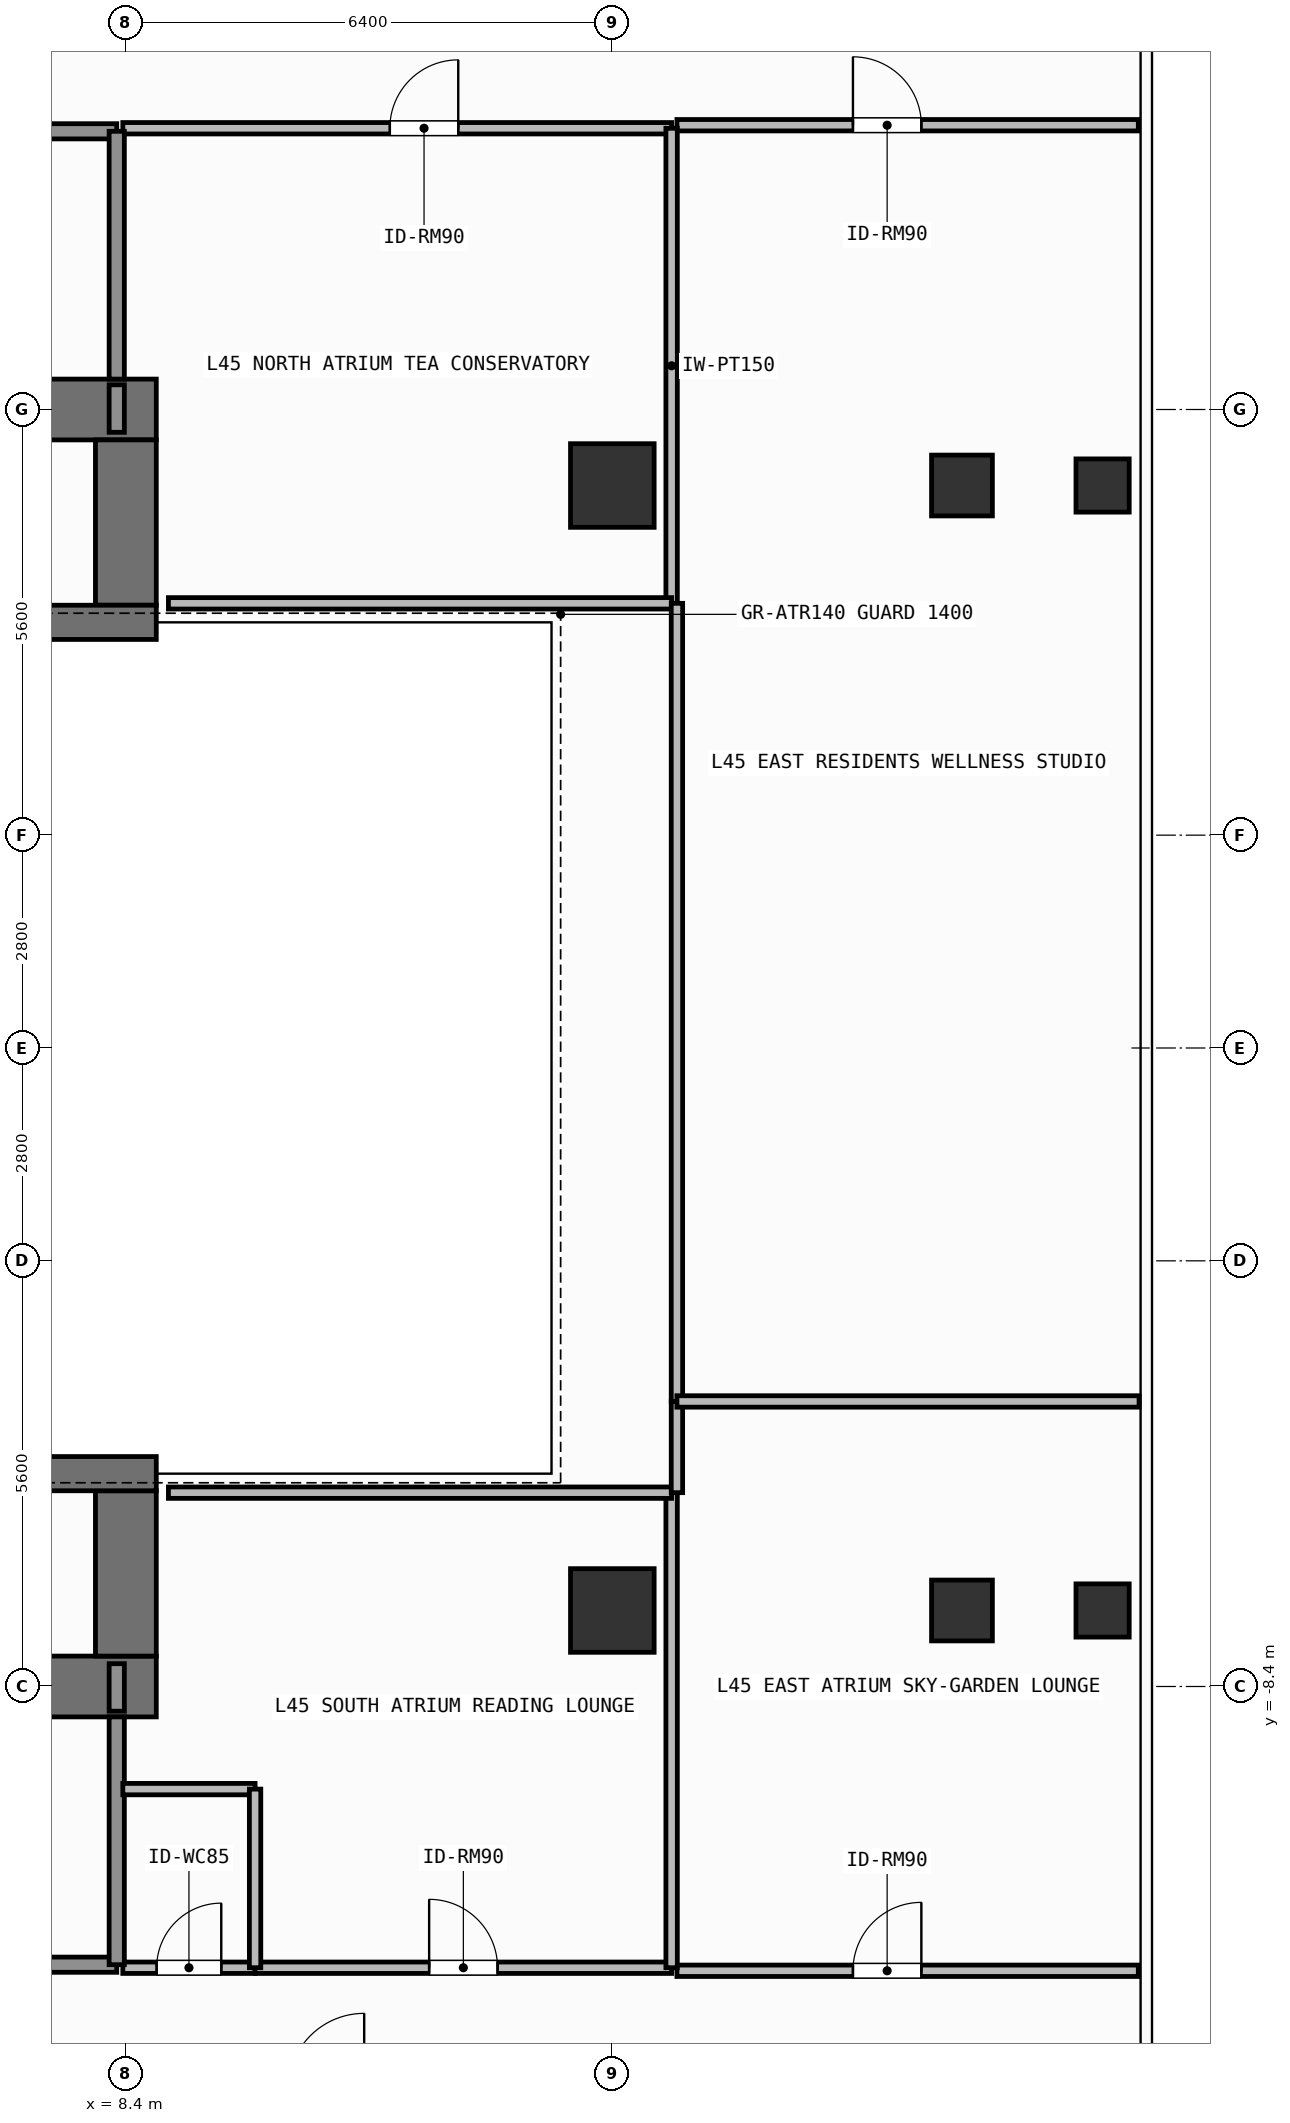
"""IFC4 building model, lengths in metres.
Left out: names, types, materials, properties, quantities, classifications, styles, units other than length and angle.
Written with IfcOpenShell. Run it as: python <this file> out.ifc"""

import sys

from ifc_helpers import new_model, si_unit, direction, frame, frame_2d, origin, origin_2d, place, context, subcontext, project, spatial, rectangle, hollow_rectangle, extrude, element, fill, save


model = new_model("IFC4")
c1 = context("Model", 3, precision=1e-05, world=origin(), true_north=direction((0.0, 1.0)))
c2 = subcontext(c1, "Body", "Model", "MODEL_VIEW")
j1 = project(units=[si_unit("LENGTHUNIT", "METRE"), si_unit("PLANEANGLEUNIT", "RADIAN")], contexts=[c1])
p1 = place(None, origin())
s1 = spatial("IfcSite", under=j1, at=p1, CompositionType="ELEMENT")
p2 = place(p1, origin())
s2 = spatial("IfcBuilding", under=s1, at=p2, CompositionType="ELEMENT")
p3 = place(p2, frame((0.0, 0.0, 183.6)))
s3 = spatial("IfcBuildingStorey", under=s2, at=p3, CompositionType="ELEMENT", Elevation=183.6)
p4 = place(p3, frame((6.12, -8.4, 0.0), z_axis=(0.0, 0.0, 1.0), x_axis=(1.0, 0.0, 0.0)))
e1 = element("IfcWall", 1, at=p4, inside=s3, PredefinedType="SHEAR", context=c2, shape_type="SweptSolid", body=[
    extrude(rectangle(XDim=2.68, YDim=0.8, at=frame_2d((1.34, 0.0))), origin(), (0.0, 0.0, 1.0), 3.9),
])
p5 = place(p3, frame((-7.55, 8.4, 0.0), z_axis=(0.0, 0.0, 1.0), x_axis=(1.0, 0.0, 0.0)))
e2 = element("IfcWall", 2, at=p5, inside=s3, PredefinedType="SHEAR", context=c2, shape_type="SweptSolid", body=[
    extrude(rectangle(XDim=16.35, YDim=0.8, at=frame_2d((8.175, 0.0))), origin(), (0.0, 0.0, 1.0), 3.9),
])
for number, where, z_axis, x_axis in (
    (3, (8.4, -8.0, 0.0), (0.0, 0.0, 1.0), (0.0, 1.0, 0.0)),
    (4, (8.4, 5.825, 0.0), (0.0, 0.0, 1.0), (0.0, 1.0, 0.0)),
):
    element("IfcWall", number, at=place(p3, frame(where, z_axis=z_axis, x_axis=x_axis)), inside=s3, PredefinedType="SHEAR", context=c2, shape_type="SweptSolid", body=[
        extrude(rectangle(XDim=2.175, YDim=0.8, at=frame_2d((1.087, 0.0))), origin(), (0.0, 0.0, 1.0), 3.9),
    ])
for number, where, z_axis, x_axis in (
    (5, (3.045, -5.6, 0.0), (0.0, 0.0, 1.0), (1.0, 0.0, 0.0)),
    (6, (3.045, 5.6, 0.0), (0.0, 0.0, 1.0), (1.0, 0.0, 0.0)),
):
    element("IfcWall", number, at=place(p3, frame(where, z_axis=z_axis, x_axis=x_axis)), inside=s3, PredefinedType="SHEAR", context=c2, shape_type="SweptSolid", body=[
        extrude(rectangle(XDim=5.755, YDim=0.45, at=frame_2d((2.877, 0.0))), origin(), (0.0, 0.0, 1.0), 3.9),
    ])
for number, where, z_axis, x_axis in (
    (7, (14.8, -7.4, 0.0), (0.0, 0.0, 1.0), (1.0, 0.0, 0.0)),
    (8, (14.8, 7.4, 0.0), (0.0, 0.0, 1.0), (1.0, 0.0, 0.0)),
):
    element("IfcColumn", number, at=place(p3, frame(where, z_axis=z_axis, x_axis=x_axis)), inside=s3, PredefinedType="COLUMN", context=c2, shape_type="SweptSolid", body=[
        extrude(rectangle(XDim=1.1, YDim=1.1, at=origin_2d()), origin(), (0.0, 0.0, 1.0), 3.9),
    ])
for number, where, z_axis, x_axis in (
    (9, (19.4, -7.4, 0.0), (0.0, 0.0, 1.0), (1.0, 0.0, 0.0)),
    (10, (19.4, 7.4, 0.0), (0.0, 0.0, 1.0), (1.0, 0.0, 0.0)),
):
    element("IfcColumn", number, at=place(p3, frame(where, z_axis=z_axis, x_axis=x_axis)), inside=s3, PredefinedType="COLUMN", context=c2, shape_type="SweptSolid", body=[
        extrude(hollow_rectangle(XDim=0.8, YDim=0.8, WallThickness=0.036, at=origin_2d()), origin(), (0.0, 0.0, 1.0), 3.9),
    ])
for number, where, z_axis, x_axis in (
    (11, (21.25, -7.4, 0.0), (0.0, 0.0, 1.0), (1.0, 0.0, 0.0)),
    (12, (21.25, 7.4, 0.0), (0.0, 0.0, 1.0), (1.0, 0.0, 0.0)),
):
    element("IfcColumn", number, at=place(p3, frame(where, z_axis=z_axis, x_axis=x_axis)), inside=s3, PredefinedType="COLUMN", context=c2, shape_type="SweptSolid", body=[
        extrude(hollow_rectangle(XDim=0.7, YDim=0.7, WallThickness=0.032, at=origin_2d()), origin(), (0.0, 0.0, 1.0), 3.9),
    ])
p6 = place(p3, frame((4.58, -12.06, 0.0), z_axis=(0.0, 0.0, 1.0), x_axis=(1.0, 0.0, 0.0)))
e13 = element("IfcWall", 13, at=p6, inside=s3, PredefinedType="SOLIDWALL", context=c2, shape_type="SweptSolid", body=[
    extrude(rectangle(XDim=3.7, YDim=0.2, at=frame_2d((1.85, 0.0))), origin(), (0.0, 0.0, 1.0), 3.68),
])
p7 = place(p6, frame((1.212, 0.0, 0.0)))
e14 = element("IfcOpeningElement", 14, at=p7, cuts=e13, PredefinedType="OPENING", context=c2, shape_type="SweptSolid", body=[
    extrude(rectangle(XDim=1.1, YDim=2.15, at=frame_2d((0.55, 1.075))), frame((0.0, 0.11, 0.0), z_axis=(0.0, -1.0, 0.0), x_axis=(1.0, 0.0, 0.0)), (0.0, 0.0, 1.0), 0.22),
])
p8 = place(p3, frame((4.58, 12.06, 0.0), z_axis=(0.0, 0.0, 1.0), x_axis=(1.0, 0.0, 0.0)))
e15 = element("IfcWall", 15, at=p8, inside=s3, PredefinedType="SOLIDWALL", context=c2, shape_type="SweptSolid", body=[
    extrude(rectangle(XDim=3.7, YDim=0.2, at=frame_2d((1.85, 0.0))), origin(), (0.0, 0.0, 1.0), 3.68),
])
p9 = place(p8, frame((1.212, 0.0, 0.0)))
e16 = element("IfcOpeningElement", 16, at=p9, cuts=e15, PredefinedType="OPENING", context=c2, shape_type="SweptSolid", body=[
    extrude(rectangle(XDim=1.1, YDim=2.15, at=frame_2d((0.55, 1.075))), frame((0.0, 0.11, 0.0), z_axis=(0.0, -1.0, 0.0), x_axis=(1.0, 0.0, 0.0)), (0.0, 0.0, 1.0), 0.22),
])
p10 = place(p3, frame((8.36, -12.1, 0.0), z_axis=(0.0, 0.0, 1.0), x_axis=(1.0, 0.0, 0.0)))
e17 = element("IfcWall", 17, at=p10, inside=s3, PredefinedType="PARTITIONING", context=c2, shape_type="SweptSolid", body=[
    extrude(rectangle(XDim=1.74, YDim=0.15, at=frame_2d((0.87, 0.0))), origin(), (0.0, 0.0, 1.0), 3.68),
])
p11 = place(p10, frame((0.445, 0.0, 0.0)))
e18 = element("IfcOpeningElement", 18, at=p11, cuts=e17, PredefinedType="OPENING", context=c2, shape_type="SweptSolid", body=[
    extrude(rectangle(XDim=0.85, YDim=2.1, at=frame_2d((0.425, 1.05))), frame((0.0, 0.085, 0.0), z_axis=(0.0, -1.0, 0.0), x_axis=(1.0, 0.0, 0.0)), (0.0, 0.0, 1.0), 0.17),
])
p12 = place(p3, frame((10.1, -12.1, 0.0), z_axis=(0.0, 0.0, 1.0), x_axis=(1.0, 0.0, 0.0)))
e19 = element("IfcWall", 19, at=p12, inside=s3, PredefinedType="PARTITIONING", context=c2, shape_type="SweptSolid", body=[
    extrude(rectangle(XDim=5.48, YDim=0.15, at=frame_2d((2.74, 0.0))), origin(), (0.0, 0.0, 1.0), 3.68),
])
p13 = place(p12, frame((2.29, 0.0, 0.0)))
e20 = element("IfcOpeningElement", 20, at=p13, cuts=e19, PredefinedType="OPENING", context=c2, shape_type="SweptSolid", body=[
    extrude(rectangle(XDim=0.9, YDim=2.1, at=frame_2d((0.45, 1.05))), frame((0.0, 0.085, 0.0), z_axis=(0.0, -1.0, 0.0), x_axis=(1.0, 0.0, 0.0)), (0.0, 0.0, 1.0), 0.17),
])
p14 = place(p3, frame((8.36, 12.1, 0.0), z_axis=(0.0, 0.0, 1.0), x_axis=(1.0, 0.0, 0.0)))
e21 = element("IfcWall", 21, at=p14, inside=s3, PredefinedType="PARTITIONING", context=c2, shape_type="SweptSolid", body=[
    extrude(rectangle(XDim=7.22, YDim=0.15, at=frame_2d((3.61, 0.0))), origin(), (0.0, 0.0, 1.0), 3.68),
])
p15 = place(p14, frame((3.513, 0.0, 0.0)))
e22 = element("IfcOpeningElement", 22, at=p15, cuts=e21, PredefinedType="OPENING", context=c2, shape_type="SweptSolid", body=[
    extrude(rectangle(XDim=0.9, YDim=2.1, at=frame_2d((0.45, 1.05))), frame((0.0, 0.085, 0.0), z_axis=(0.0, -1.0, 0.0), x_axis=(1.0, 0.0, 0.0)), (0.0, 0.0, 1.0), 0.17),
])
p16 = place(p3, frame((15.65, -12.14, 0.0), z_axis=(0.0, 0.0, 1.0), x_axis=(1.0, 0.0, 0.0)))
e23 = element("IfcWall", 23, at=p16, inside=s3, PredefinedType="PARTITIONING", context=c2, shape_type="SweptSolid", body=[
    extrude(rectangle(XDim=6.07, YDim=0.15, at=frame_2d((3.035, 0.0))), origin(), (0.0, 0.0, 1.0), 3.68),
])
p17 = place(p16, frame((2.316, 0.0, 0.0)))
e24 = element("IfcOpeningElement", 24, at=p17, cuts=e23, PredefinedType="OPENING", context=c2, shape_type="SweptSolid", body=[
    extrude(rectangle(XDim=0.9, YDim=2.1, at=frame_2d((0.45, 1.05))), frame((0.0, 0.085, 0.0), z_axis=(0.0, -1.0, 0.0), x_axis=(1.0, 0.0, 0.0)), (0.0, 0.0, 1.0), 0.17),
])
p18 = place(p3, frame((15.65, 12.14, 0.0), z_axis=(0.0, 0.0, 1.0), x_axis=(1.0, 0.0, 0.0)))
e25 = element("IfcWall", 25, at=p18, inside=s3, PredefinedType="PARTITIONING", context=c2, shape_type="SweptSolid", body=[
    extrude(rectangle(XDim=6.07, YDim=0.15, at=frame_2d((3.035, 0.0))), origin(), (0.0, 0.0, 1.0), 3.68),
])
p19 = place(p18, frame((2.316, 0.0, 0.0)))
e26 = element("IfcOpeningElement", 26, at=p19, cuts=e25, PredefinedType="OPENING", context=c2, shape_type="SweptSolid", body=[
    extrude(rectangle(XDim=0.9, YDim=2.1, at=frame_2d((0.45, 1.05))), frame((0.0, 0.085, 0.0), z_axis=(0.0, -1.0, 0.0), x_axis=(1.0, 0.0, 0.0)), (0.0, 0.0, 1.0), 0.17),
])
for number, where, z_axis, x_axis in (
    (27, (8.28, -12.06, 0.0), (0.0, 0.0, 1.0), (0.0, 1.0, 0.0)),
    (28, (8.28, 8.8, 0.0), (0.0, 0.0, 1.0), (0.0, 1.0, 0.0)),
):
    element("IfcWall", number, at=place(p3, frame(where, z_axis=z_axis, x_axis=x_axis)), inside=s3, PredefinedType="SOLIDWALL", context=c2, shape_type="SweptSolid", body=[
        extrude(rectangle(XDim=3.26, YDim=0.2, at=frame_2d((1.63, 0.0))), origin(), (0.0, 0.0, 1.0), 3.68),
    ])
p20 = place(p3, frame((8.28, -8.725, 0.0), z_axis=(0.0, 0.0, 1.0), x_axis=(0.0, 1.0, 0.0)))
e29 = element("IfcWall", 29, at=p20, inside=s3, PredefinedType="SOLIDWALL", context=c2, shape_type="SweptSolid", body=[
    extrude(rectangle(XDim=0.625, YDim=0.2, at=frame_2d((0.312, 0.0))), origin(), (0.0, 0.0, 1.0), 3.68),
])
p21 = place(p3, frame((8.36, -9.75, 0.0), z_axis=(0.0, 0.0, 1.0), x_axis=(1.0, 0.0, 0.0)))
e30 = element("IfcWall", 30, at=p21, inside=s3, PredefinedType="PARTITIONING", context=c2, shape_type="SweptSolid", body=[
    extrude(rectangle(XDim=1.74, YDim=0.15, at=frame_2d((0.87, 0.0))), origin(), (0.0, 0.0, 1.0), 3.68),
])
p22 = place(p3, frame((10.1, -12.1, 0.0), z_axis=(0.0, 0.0, 1.0), x_axis=(0.0, 1.0, 0.0)))
e31 = element("IfcWall", 31, at=p22, inside=s3, PredefinedType="PARTITIONING", context=c2, shape_type="SweptSolid", body=[
    extrude(rectangle(XDim=2.35, YDim=0.15, at=frame_2d((1.175, 0.0))), origin(), (0.0, 0.0, 1.0), 3.68),
])
p23 = place(p3, frame((15.58, -12.1, 0.0), z_axis=(0.0, 0.0, 1.0), x_axis=(0.0, 1.0, 0.0)))
e32 = element("IfcWall", 32, at=p23, inside=s3, PredefinedType="PARTITIONING", context=c2, shape_type="SweptSolid", body=[
    extrude(rectangle(XDim=6.25, YDim=0.15, at=frame_2d((3.125, 0.0))), origin(), (0.0, 0.0, 1.0), 3.68),
])
p24 = place(p3, frame((8.96, -5.85, 0.0), z_axis=(0.0, 0.0, 1.0), x_axis=(1.0, 0.0, 0.0)))
e33 = element("IfcWall", 33, at=p24, inside=s3, PredefinedType="PARTITIONING", context=c2, shape_type="SweptSolid", body=[
    extrude(rectangle(XDim=6.62, YDim=0.15, at=frame_2d((3.31, 0.0))), origin(), (0.0, 0.0, 1.0), 3.68),
])
p25 = place(p3, frame((8.28, 8.1, 0.0), z_axis=(0.0, 0.0, 1.0), x_axis=(0.0, 1.0, 0.0)))
e34 = element("IfcWall", 34, at=p25, inside=s3, PredefinedType="SOLIDWALL", context=c2, shape_type="SweptSolid", body=[
    extrude(rectangle(XDim=0.625, YDim=0.2, at=frame_2d((0.312, 0.0))), origin(), (0.0, 0.0, 1.0), 3.68),
])
p26 = place(p3, frame((15.58, 5.85, 0.0), z_axis=(0.0, 0.0, 1.0), x_axis=(0.0, 1.0, 0.0)))
e35 = element("IfcWall", 35, at=p26, inside=s3, PredefinedType="PARTITIONING", context=c2, shape_type="SweptSolid", body=[
    extrude(rectangle(XDim=6.25, YDim=0.15, at=frame_2d((3.125, 0.0))), origin(), (0.0, 0.0, 1.0), 3.68),
])
p27 = place(p3, frame((8.96, 5.85, 0.0), z_axis=(0.0, 0.0, 1.0), x_axis=(1.0, 0.0, 0.0)))
e36 = element("IfcWall", 36, at=p27, inside=s3, PredefinedType="PARTITIONING", context=c2, shape_type="SweptSolid", body=[
    extrude(rectangle(XDim=6.62, YDim=0.15, at=frame_2d((3.31, 0.0))), origin(), (0.0, 0.0, 1.0), 3.68),
])
p28 = place(p3, frame((15.65, -5.85, 0.0), z_axis=(0.0, 0.0, 1.0), x_axis=(0.0, 1.0, 0.0)))
e37 = element("IfcWall", 37, at=p28, inside=s3, PredefinedType="PARTITIONING", context=c2, shape_type="SweptSolid", body=[
    extrude(rectangle(XDim=1.2, YDim=0.15, at=frame_2d((0.6, 0.0))), origin(), (0.0, 0.0, 1.0), 3.68),
])
p29 = place(p3, frame((15.65, -4.65, 0.0), z_axis=(0.0, 0.0, 1.0), x_axis=(0.0, 1.0, 0.0)))
e38 = element("IfcWall", 38, at=p29, inside=s3, PredefinedType="PARTITIONING", context=c2, shape_type="SweptSolid", body=[
    extrude(rectangle(XDim=10.5, YDim=0.15, at=frame_2d((5.25, 0.0))), origin(), (0.0, 0.0, 1.0), 3.68),
])
p30 = place(p3, frame((15.65, -4.65, 0.0), z_axis=(0.0, 0.0, 1.0), x_axis=(1.0, 0.0, 0.0)))
e39 = element("IfcWall", 39, at=p30, inside=s3, PredefinedType="PARTITIONING", context=c2, shape_type="SweptSolid", body=[
    extrude(rectangle(XDim=6.08, YDim=0.15, at=frame_2d((3.04, 0.0))), origin(), (0.0, 0.0, 1.0), 3.68),
])
p31 = place(p11, origin())
e40 = element("IfcDoor", 40, at=p31, inside=s3, OperationType="SINGLE_SWING_RIGHT", PredefinedType="DOOR", context=c2, shape_type="SweptSolid", body=[
    extrude(rectangle(XDim=0.85, YDim=2.1, at=frame_2d((0.425, 1.05))), frame((0.0, 0.025, 0.0), z_axis=(0.0, -1.0, 0.0), x_axis=(1.0, 0.0, 0.0)), (0.0, 0.0, 1.0), 0.05),
])
fill(e18, e40)
p32 = place(p13, origin())
e41 = element("IfcDoor", 41, at=p32, inside=s3, OperationType="SINGLE_SWING_LEFT", PredefinedType="DOOR", context=c2, shape_type="SweptSolid", body=[
    extrude(rectangle(XDim=0.9, YDim=2.1, at=frame_2d((0.45, 1.05))), frame((0.0, 0.025, 0.0), z_axis=(0.0, -1.0, 0.0), x_axis=(1.0, 0.0, 0.0)), (0.0, 0.0, 1.0), 0.05),
])
fill(e20, e41)
p33 = place(p15, origin())
e42 = element("IfcDoor", 42, at=p33, inside=s3, OperationType="SINGLE_SWING_RIGHT", PredefinedType="DOOR", context=c2, shape_type="SweptSolid", body=[
    extrude(rectangle(XDim=0.9, YDim=2.1, at=frame_2d((0.45, 1.05))), frame((0.0, 0.025, 0.0), z_axis=(0.0, -1.0, 0.0), x_axis=(1.0, 0.0, 0.0)), (0.0, 0.0, 1.0), 0.05),
])
fill(e22, e42)
p34 = place(p17, origin())
e43 = element("IfcDoor", 43, at=p34, inside=s3, OperationType="SINGLE_SWING_RIGHT", PredefinedType="DOOR", context=c2, shape_type="SweptSolid", body=[
    extrude(rectangle(XDim=0.9, YDim=2.1, at=frame_2d((0.45, 1.05))), frame((0.0, 0.025, 0.0), z_axis=(0.0, -1.0, 0.0), x_axis=(1.0, 0.0, 0.0)), (0.0, 0.0, 1.0), 0.05),
])
fill(e24, e43)
p35 = place(p19, origin())
e44 = element("IfcDoor", 44, at=p35, inside=s3, OperationType="SINGLE_SWING_LEFT", PredefinedType="DOOR", context=c2, shape_type="SweptSolid", body=[
    extrude(rectangle(XDim=0.9, YDim=2.1, at=frame_2d((0.45, 1.05))), frame((0.0, 0.025, 0.0), z_axis=(0.0, -1.0, 0.0), x_axis=(1.0, 0.0, 0.0)), (0.0, 0.0, 1.0), 0.05),
])
fill(e26, e44)
save(model, sys.argv[1])
